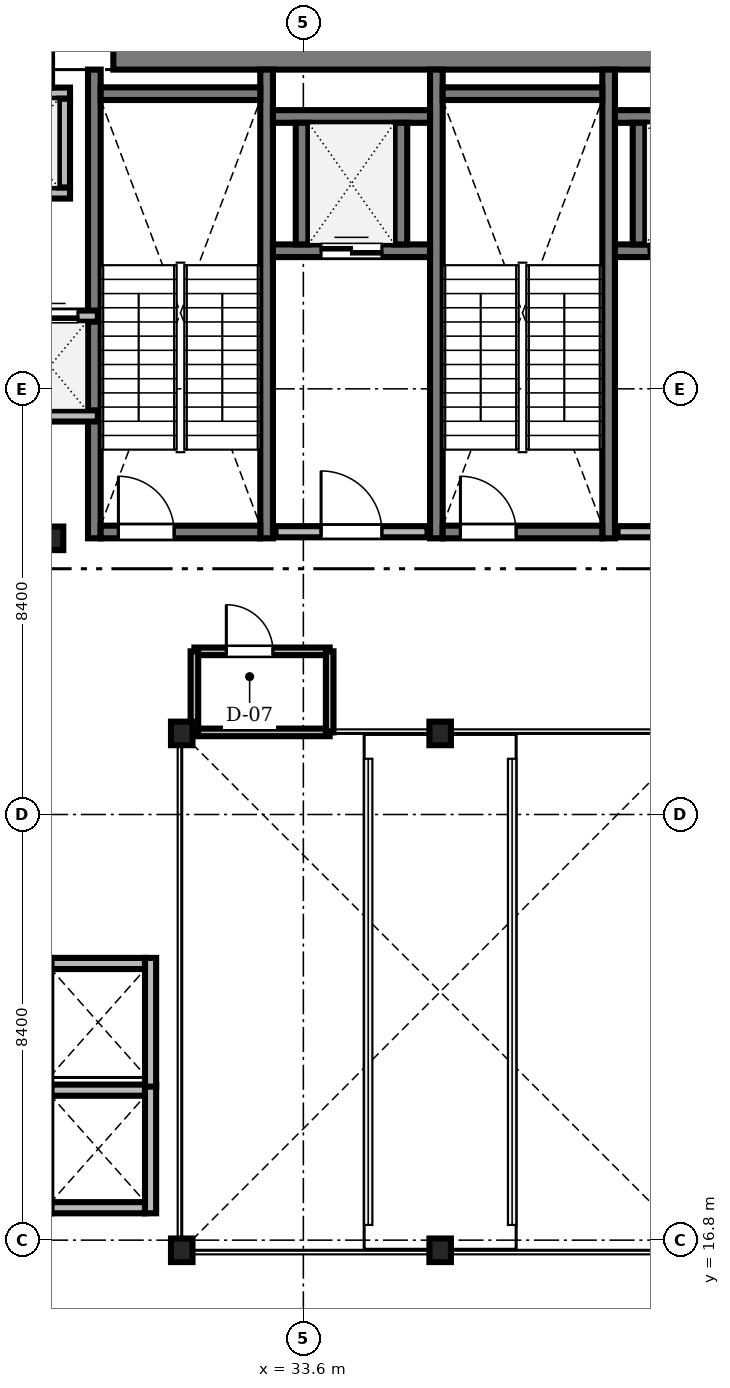
"""IFC4 building model, lengths in metres.
Left out: names, types, materials, properties, quantities, classifications, styles, units other than length and angle.
Written with IfcOpenShell. Run it as: python <this file> out.ifc"""

import sys

from ifc_helpers import new_model, si_unit, direction, frame, frame_2d, origin, origin_2d, place, context, subcontext, project, spatial, rectangle, i_section, extrude, source, transform, mapped, element, fill, save


model = new_model("IFC4")
c1 = context("Model", 3, precision=1e-05, world=origin(), true_north=direction((0.0, 1.0)))
c2 = subcontext(c1, "Body", "Model", "MODEL_VIEW")
j1 = project(units=[si_unit("LENGTHUNIT", "METRE"), si_unit("PLANEANGLEUNIT", "RADIAN")], contexts=[c1])
p1 = place(None, origin())
s1 = spatial("IfcSite", under=j1, at=p1, CompositionType="ELEMENT")
p2 = place(p1, origin())
s2 = spatial("IfcBuilding", under=s1, at=p2, CompositionType="ELEMENT")
p3 = place(p2, frame((0.0, 0.0, 98.7)))
s3 = spatial("IfcBuildingStorey", under=s2, at=p3, CompositionType="ELEMENT", Elevation=98.7)
m1 = source(origin(), c2, "Body", "SweptSolid", [
    extrude(rectangle(XDim=17.52, YDim=0.8, at=frame_2d((8.76, 0.0))), origin(), (0.0, 0.0, 1.0), 4.76),
])
p4 = place(p3, frame((29.85, 40.3, 0.0), z_axis=(0.0, 0.0, 1.0), x_axis=(1.0, 0.0, 0.0)))
e1 = element("IfcWall", 1, at=p4, inside=s3, PredefinedType="SHEAR", context=c2, shape_type="MappedRepresentation", body=[
    mapped(m1, transform((0.0, 0.0, 0.0), scale=1.0)),
])
m2 = source(origin(), c2, "Body", "SweptSolid", [
    extrude(i_section(OverallWidth=0.424, OverallDepth=0.465, WebThickness=0.035, FlangeThickness=0.056, FilletRadius=0.015, at=origin_2d()), origin(), (0.0, 0.0, 1.0), 4.76),
])
for number, where, z_axis, x_axis in (
    (2, (31.2, 16.6, 0.0), (0.0, 0.0, 1.0), (1.0, 0.0, 0.0)),
    (3, (36.3, 16.6, 0.0), (0.0, 0.0, 1.0), (1.0, 0.0, 0.0)),
    (4, (36.3, 26.8, 0.0), (0.0, 0.0, 1.0), (1.0, 0.0, 0.0)),
    (5, (31.2, 26.8, 0.0), (0.0, 0.0, 1.0), (1.0, 0.0, 0.0)),
    (6, (28.65, 30.65, 0.0), (0.0, 0.0, 1.0), (1.0, 0.0, 0.0)),
):
    element("IfcColumn", number, at=place(p3, frame(where, z_axis=z_axis, x_axis=x_axis)), inside=s3, PredefinedType="COLUMN", context=c2, shape_type="MappedRepresentation", body=[
        mapped(m2, transform((0.0, 0.0, 0.0), scale=1.0)),
    ])
m3 = source(origin(), c2, "Body", "SweptSolid", [
    extrude(rectangle(XDim=9.25, YDim=0.25, at=frame_2d((4.625, 0.0))), origin(), (0.0, 0.0, 1.0), 4.8),
])
for number, where, z_axis, x_axis in (
    (7, (29.475, 30.65, 0.0), (0.0, 0.0, 1.0), (0.0, 1.0, 0.0)),
    (8, (32.875, 30.65, 0.0), (0.0, 0.0, 1.0), (0.0, 1.0, 0.0)),
):
    element("IfcWall", number, at=place(p3, frame(where, z_axis=z_axis, x_axis=x_axis)), inside=s3, PredefinedType="SOLIDWALL", context=c2, shape_type="MappedRepresentation", body=[
        mapped(m3, transform((0.0, 0.0, 0.0), scale=1.0)),
    ])
m4 = source(origin(), c2, "Body", "SweptSolid", [
    extrude(rectangle(XDim=3.15, YDim=0.25, at=frame_2d((1.575, 0.0))), origin(), (0.0, 0.0, 1.0), 4.8),
])
p5 = place(p3, frame((29.6, 39.425, 0.0), z_axis=(0.0, 0.0, 1.0), x_axis=(1.0, 0.0, 0.0)))
e9 = element("IfcWall", 9, at=p5, inside=s3, PredefinedType="SOLIDWALL", context=c2, shape_type="MappedRepresentation", body=[
    mapped(m4, transform((0.0, 0.0, 0.0), scale=1.0)),
])
p6 = place(p3, frame((29.6, 30.775, 0.0), z_axis=(0.0, 0.0, 1.0), x_axis=(1.0, 0.0, 0.0)))
e10 = element("IfcWall", 10, at=p6, inside=s3, PredefinedType="SOLIDWALL", context=c2, shape_type="MappedRepresentation", body=[
    mapped(m4, transform((0.0, 0.0, 0.0), scale=1.0)),
])
m5 = source(origin(), c2, "Body", "SweptSolid", [
    extrude(rectangle(XDim=1.1, YDim=2.2, at=frame_2d((0.55, 1.1))), frame((0.0, 0.135, 0.0), z_axis=(0.0, -1.0, 0.0), x_axis=(1.0, 0.0, 0.0)), (0.0, 0.0, 1.0), 0.27),
])
p7 = place(p6, frame((0.35, 0.0, 0.0)))
e11 = element("IfcOpeningElement", 11, at=p7, cuts=e10, PredefinedType="OPENING", context=c2, shape_type="MappedRepresentation", body=[
    mapped(m5, transform((0.0, 0.0, 0.0), scale=1.0)),
])
for number, where, z_axis, x_axis in (
    (12, (36.225, 30.65, 0.0), (0.0, 0.0, 1.0), (0.0, 1.0, 0.0)),
    (13, (39.625, 30.65, 0.0), (0.0, 0.0, 1.0), (0.0, 1.0, 0.0)),
):
    element("IfcWall", number, at=place(p3, frame(where, z_axis=z_axis, x_axis=x_axis)), inside=s3, PredefinedType="SOLIDWALL", context=c2, shape_type="MappedRepresentation", body=[
        mapped(m3, transform((0.0, 0.0, 0.0), scale=1.0)),
    ])
p8 = place(p3, frame((36.35, 39.425, 0.0), z_axis=(0.0, 0.0, 1.0), x_axis=(1.0, 0.0, 0.0)))
e14 = element("IfcWall", 14, at=p8, inside=s3, PredefinedType="SOLIDWALL", context=c2, shape_type="MappedRepresentation", body=[
    mapped(m4, transform((0.0, 0.0, 0.0), scale=1.0)),
])
p9 = place(p3, frame((36.35, 30.775, 0.0), z_axis=(0.0, 0.0, 1.0), x_axis=(1.0, 0.0, 0.0)))
e15 = element("IfcWall", 15, at=p9, inside=s3, PredefinedType="SOLIDWALL", context=c2, shape_type="MappedRepresentation", body=[
    mapped(m4, transform((0.0, 0.0, 0.0), scale=1.0)),
])
p10 = place(p9, frame((0.35, 0.0, 0.0)))
e16 = element("IfcOpeningElement", 16, at=p10, cuts=e15, PredefinedType="OPENING", context=c2, shape_type="MappedRepresentation", body=[
    mapped(m5, transform((0.0, 0.0, 0.0), scale=1.0)),
])
m6 = source(origin(), c2, "Body", "SweptSolid", [
    extrude(rectangle(XDim=3.0, YDim=0.22, at=frame_2d((1.5, 0.0))), origin(), (0.0, 0.0, 1.0), 4.76),
])
p11 = place(p3, frame((33.05, 30.78, 0.0), z_axis=(0.0, 0.0, 1.0), x_axis=(1.0, 0.0, 0.0)))
e17 = element("IfcWall", 17, at=p11, inside=s3, PredefinedType="SOLIDWALL", context=c2, shape_type="MappedRepresentation", body=[
    mapped(m6, transform((0.0, 0.0, 0.0), scale=1.0)),
])
m7 = source(origin(), c2, "Body", "SweptSolid", [
    extrude(rectangle(XDim=1.2, YDim=2.2, at=frame_2d((0.6, 1.1))), frame((0.0, 0.12, 0.0), z_axis=(0.0, -1.0, 0.0), x_axis=(1.0, 0.0, 0.0)), (0.0, 0.0, 1.0), 0.24),
])
p12 = place(p11, frame((0.9, 0.0, 0.0)))
e18 = element("IfcOpeningElement", 18, at=p12, cuts=e17, PredefinedType="OPENING", context=c2, shape_type="MappedRepresentation", body=[
    mapped(m7, transform((0.0, 0.0, 0.0), scale=1.0)),
])
m8 = source(origin(), c2, "Body", "SweptSolid", [
    extrude(rectangle(XDim=2.8, YDim=0.22, at=frame_2d((1.4, 0.0))), origin(), (0.0, 0.0, 1.0), 4.76),
])
p13 = place(p3, frame((39.8, 30.78, 0.0), z_axis=(0.0, 0.0, 1.0), x_axis=(1.0, 0.0, 0.0)))
e19 = element("IfcWall", 19, at=p13, inside=s3, PredefinedType="SOLIDWALL", context=c2, shape_type="MappedRepresentation", body=[
    mapped(m8, transform((0.0, 0.0, 0.0), scale=1.0)),
])
p14 = place(p13, frame((0.8, 0.0, 0.0)))
e20 = element("IfcOpeningElement", 20, at=p14, cuts=e19, PredefinedType="OPENING", context=c2, shape_type="MappedRepresentation", body=[
    mapped(m7, transform((0.0, 0.0, 0.0), scale=1.0)),
])
m9 = source(origin(), c2, "Body", "SweptSolid", [
    extrude(rectangle(XDim=1.99, YDim=0.22, at=frame_2d((0.995, 0.0))), origin(), (0.0, 0.0, 1.0), 4.76),
])
p15 = place(p3, frame((27.005, 37.465, 0.0), z_axis=(0.0, 0.0, 1.0), x_axis=(1.0, 0.0, 0.0)))
e21 = element("IfcWall", 21, at=p15, inside=s3, PredefinedType="SOLIDWALL", context=c2, shape_type="MappedRepresentation", body=[
    mapped(m9, transform((0.0, 0.0, 0.0), scale=1.0)),
])
m10 = source(origin(), c2, "Body", "SweptSolid", [
    extrude(rectangle(XDim=1.1, YDim=2.2, at=frame_2d((0.55, 1.1))), frame((0.0, 0.12, 0.0), z_axis=(0.0, -1.0, 0.0), x_axis=(1.0, 0.0, 0.0)), (0.0, 0.0, 1.0), 0.24),
])
p16 = place(p15, frame((0.445, 0.0, 0.0)))
e22 = element("IfcOpeningElement", 22, at=p16, cuts=e21, PredefinedType="OPENING", context=c2, shape_type="MappedRepresentation", body=[
    mapped(m10, transform((0.0, 0.0, 0.0), scale=1.0)),
])
p17 = place(p3, frame((27.005, 39.435, 0.0), z_axis=(0.0, 0.0, 1.0), x_axis=(1.0, 0.0, 0.0)))
e23 = element("IfcWall", 23, at=p17, inside=s3, PredefinedType="SOLIDWALL", context=c2, shape_type="MappedRepresentation", body=[
    mapped(m9, transform((0.0, 0.0, 0.0), scale=1.0)),
])
m11 = source(origin(), c2, "Body", "SweptSolid", [
    extrude(rectangle(XDim=1.75, YDim=0.22, at=frame_2d((0.875, 0.0))), origin(), (0.0, 0.0, 1.0), 4.76),
])
p18 = place(p3, frame((28.885, 37.575, 0.0), z_axis=(0.0, 0.0, 1.0), x_axis=(0.0, 1.0, 0.0)))
e24 = element("IfcWall", 24, at=p18, inside=s3, PredefinedType="SOLIDWALL", context=c2, shape_type="MappedRepresentation", body=[
    mapped(m11, transform((0.0, 0.0, 0.0), scale=1.0)),
])
m12 = source(origin(), c2, "Body", "SweptSolid", [
    extrude(rectangle(XDim=1.89, YDim=0.22, at=frame_2d((0.945, 0.0))), origin(), (0.0, 0.0, 1.0), 4.76),
])
p19 = place(p3, frame((27.655, 33.065, 0.0), z_axis=(0.0, 0.0, 1.0), x_axis=(1.0, 0.0, 0.0)))
e25 = element("IfcWall", 25, at=p19, inside=s3, PredefinedType="SOLIDWALL", context=c2, shape_type="MappedRepresentation", body=[
    mapped(m12, transform((0.0, 0.0, 0.0), scale=1.0)),
])
p20 = place(p3, frame((27.655, 35.035, 0.0), z_axis=(0.0, 0.0, 1.0), x_axis=(1.0, 0.0, 0.0)))
e26 = element("IfcWall", 26, at=p20, inside=s3, PredefinedType="SOLIDWALL", context=c2, shape_type="MappedRepresentation", body=[
    mapped(m12, transform((0.0, 0.0, 0.0), scale=1.0)),
])
p21 = place(p20, frame((0.395, 0.0, 0.0)))
e27 = element("IfcOpeningElement", 27, at=p21, cuts=e26, PredefinedType="OPENING", context=c2, shape_type="MappedRepresentation", body=[
    mapped(m10, transform((0.0, 0.0, 0.0), scale=1.0)),
])
m13 = source(origin(), c2, "Body", "SweptSolid", [
    extrude(rectangle(XDim=3.1, YDim=0.25, at=frame_2d((1.55, 0.0))), origin(), (0.0, 0.0, 1.0), 4.76),
])
p22 = place(p3, frame((33.0, 36.325, 0.0), z_axis=(0.0, 0.0, 1.0), x_axis=(1.0, 0.0, 0.0)))
e28 = element("IfcWall", 28, at=p22, inside=s3, PredefinedType="SOLIDWALL", context=c2, shape_type="MappedRepresentation", body=[
    mapped(m13, transform((0.0, 0.0, 0.0), scale=1.0)),
])
m14 = source(origin(), c2, "Body", "SweptSolid", [
    extrude(rectangle(XDim=1.2, YDim=2.25, at=frame_2d((0.6, 1.125))), frame((0.0, 0.135, 0.0), z_axis=(0.0, -1.0, 0.0), x_axis=(1.0, 0.0, 0.0)), (0.0, 0.0, 1.0), 0.27),
])
p23 = place(p22, frame((0.95, 0.0, 0.0)))
e29 = element("IfcOpeningElement", 29, at=p23, cuts=e28, PredefinedType="OPENING", context=c2, shape_type="MappedRepresentation", body=[
    mapped(m14, transform((0.0, 0.0, 0.0), scale=1.0)),
])
p24 = place(p3, frame((33.0, 38.975, 0.0), z_axis=(0.0, 0.0, 1.0), x_axis=(1.0, 0.0, 0.0)))
e30 = element("IfcWall", 30, at=p24, inside=s3, PredefinedType="SOLIDWALL", context=c2, shape_type="MappedRepresentation", body=[
    mapped(m13, transform((0.0, 0.0, 0.0), scale=1.0)),
])
m15 = source(origin(), c2, "Body", "SweptSolid", [
    extrude(rectangle(XDim=2.4, YDim=0.25, at=frame_2d((1.2, 0.0))), origin(), (0.0, 0.0, 1.0), 4.76),
])
for number, where, z_axis, x_axis in (
    (31, (33.575, 36.45, 0.0), (0.0, 0.0, 1.0), (0.0, 1.0, 0.0)),
    (32, (35.525, 36.45, 0.0), (0.0, 0.0, 1.0), (0.0, 1.0, 0.0)),
):
    element("IfcWall", number, at=place(p3, frame(where, z_axis=z_axis, x_axis=x_axis)), inside=s3, PredefinedType="SOLIDWALL", context=c2, shape_type="MappedRepresentation", body=[
        mapped(m15, transform((0.0, 0.0, 0.0), scale=1.0)),
    ])
m16 = source(origin(), c2, "Body", "SweptSolid", [
    extrude(rectangle(XDim=2.55, YDim=0.25, at=frame_2d((1.275, 0.0))), origin(), (0.0, 0.0, 1.0), 4.76),
])
p25 = place(p3, frame((39.75, 36.325, 0.0), z_axis=(0.0, 0.0, 1.0), x_axis=(1.0, 0.0, 0.0)))
e33 = element("IfcWall", 33, at=p25, inside=s3, PredefinedType="SOLIDWALL", context=c2, shape_type="MappedRepresentation", body=[
    mapped(m16, transform((0.0, 0.0, 0.0), scale=1.0)),
])
p26 = place(p25, frame((0.675, 0.0, 0.0)))
e34 = element("IfcOpeningElement", 34, at=p26, cuts=e33, PredefinedType="OPENING", context=c2, shape_type="MappedRepresentation", body=[
    mapped(m14, transform((0.0, 0.0, 0.0), scale=1.0)),
])
p27 = place(p3, frame((39.75, 38.975, 0.0), z_axis=(0.0, 0.0, 1.0), x_axis=(1.0, 0.0, 0.0)))
e35 = element("IfcWall", 35, at=p27, inside=s3, PredefinedType="SOLIDWALL", context=c2, shape_type="MappedRepresentation", body=[
    mapped(m16, transform((0.0, 0.0, 0.0), scale=1.0)),
])
p28 = place(p3, frame((40.225, 36.45, 0.0), z_axis=(0.0, 0.0, 1.0), x_axis=(0.0, 1.0, 0.0)))
e36 = element("IfcWall", 36, at=p28, inside=s3, PredefinedType="SOLIDWALL", context=c2, shape_type="MappedRepresentation", body=[
    mapped(m15, transform((0.0, 0.0, 0.0), scale=1.0)),
])
m17 = source(origin(), c2, "Body", "SweptSolid", [
    extrude(rectangle(XDim=1.85, YDim=0.22, at=frame_2d((0.925, 0.0))), origin(), (0.0, 0.0, 1.0), 4.76),
])
for number, where, z_axis, x_axis in (
    (37, (28.625, 17.44, 0.0), (0.0, 0.0, 1.0), (1.0, 0.0, 0.0)),
    (38, (28.625, 19.76, 0.0), (0.0, 0.0, 1.0), (1.0, 0.0, 0.0)),
):
    element("IfcWall", number, at=place(p3, frame(where, z_axis=z_axis, x_axis=x_axis)), inside=s3, PredefinedType="SOLIDWALL", context=c2, shape_type="MappedRepresentation", body=[
        mapped(m17, transform((0.0, 0.0, 0.0), scale=1.0)),
    ])
m18 = source(origin(), c2, "Body", "SweptSolid", [
    extrude(rectangle(XDim=2.54, YDim=0.22, at=frame_2d((1.27, 0.0))), origin(), (0.0, 0.0, 1.0), 4.76),
])
p29 = place(p3, frame((30.585, 17.33, 0.0), z_axis=(0.0, 0.0, 1.0), x_axis=(0.0, 1.0, 0.0)))
e39 = element("IfcWall", 39, at=p29, inside=s3, PredefinedType="SOLIDWALL", context=c2, shape_type="MappedRepresentation", body=[
    mapped(m18, transform((0.0, 0.0, 0.0), scale=1.0)),
])
p30 = place(p3, frame((28.625, 22.26, 0.0), z_axis=(0.0, 0.0, 1.0), x_axis=(1.0, 0.0, 0.0)))
e40 = element("IfcWall", 40, at=p30, inside=s3, PredefinedType="SOLIDWALL", context=c2, shape_type="MappedRepresentation", body=[
    mapped(m17, transform((0.0, 0.0, 0.0), scale=1.0)),
])
p31 = place(p3, frame((30.585, 19.83, 0.0), z_axis=(0.0, 0.0, 1.0), x_axis=(0.0, 1.0, 0.0)))
e41 = element("IfcWall", 41, at=p31, inside=s3, PredefinedType="SOLIDWALL", context=c2, shape_type="MappedRepresentation", body=[
    mapped(m18, transform((0.0, 0.0, 0.0), scale=1.0)),
])
m19 = source(origin(), c2, "Body", "SweptSolid", [
    extrude(rectangle(XDim=2.67, YDim=0.15, at=frame_2d((1.335, 0.0))), origin(), (0.0, 0.0, 1.0), 4.392),
])
p32 = place(p3, frame((31.45, 28.42, 0.0), z_axis=(0.0, 0.0, 1.0), x_axis=(1.0, 0.0, 0.0)))
e42 = element("IfcWall", 42, at=p32, inside=s3, PredefinedType="PARTITIONING", context=c2, shape_type="MappedRepresentation", body=[
    mapped(m19, transform((0.0, 0.0, 0.0), scale=1.0)),
])
m20 = source(origin(), c2, "Body", "SweptSolid", [
    extrude(rectangle(XDim=0.92, YDim=2.1, at=frame_2d((0.46, 1.05))), frame((0.0, 0.085, 0.0), z_axis=(0.0, -1.0, 0.0), x_axis=(1.0, 0.0, 0.0)), (0.0, 0.0, 1.0), 0.17),
])
p33 = place(p32, frame((0.63, 0.0, 0.0)))
e43 = element("IfcOpeningElement", 43, at=p33, cuts=e42, PredefinedType="OPENING", context=c2, shape_type="MappedRepresentation", body=[
    mapped(m20, transform((0.0, 0.0, 0.0), scale=1.0)),
])
m21 = source(origin(), c2, "Body", "SweptSolid", [
    extrude(rectangle(XDim=2.67, YDim=0.15, at=frame_2d((1.335, 0.0))), origin(), (0.0, 0.0, 1.0), 4.302),
])
p34 = place(p3, frame((31.45, 26.82, 0.0), z_axis=(0.0, 0.0, 1.0), x_axis=(1.0, 0.0, 0.0)))
e44 = element("IfcWall", 44, at=p34, inside=s3, PredefinedType="PARTITIONING", context=c2, shape_type="MappedRepresentation", body=[
    mapped(m21, transform((0.0, 0.0, 0.0), scale=1.0)),
])
m22 = source(origin(), c2, "Body", "SweptSolid", [
    extrude(rectangle(XDim=1.6, YDim=0.15, at=frame_2d((0.8, 0.0))), origin(), (0.0, 0.0, 1.0), 4.302),
])
for number, where, z_axis, x_axis in (
    (45, (31.45, 26.82, 0.0), (0.0, 0.0, 1.0), (0.0, 1.0, 0.0)),
    (46, (34.12, 26.82, 0.0), (0.0, 0.0, 1.0), (0.0, 1.0, 0.0)),
):
    element("IfcWall", number, at=place(p3, frame(where, z_axis=z_axis, x_axis=x_axis)), inside=s3, PredefinedType="PARTITIONING", context=c2, shape_type="MappedRepresentation", body=[
        mapped(m22, transform((0.0, 0.0, 0.0), scale=1.0)),
    ])
m23 = source(origin(), c2, "Body", "SweptSolid", [
    extrude(rectangle(XDim=1.1, YDim=2.2, at=frame_2d((0.55, 1.1))), frame((0.0, 0.025, 0.0), z_axis=(0.0, -1.0, 0.0), x_axis=(1.0, 0.0, 0.0)), (0.0, 0.0, 1.0), 0.05),
])
p35 = place(p7, origin())
e47 = element("IfcDoor", 47, at=p35, inside=s3, OperationType="SINGLE_SWING_LEFT", PredefinedType="DOOR", context=c2, shape_type="MappedRepresentation", body=[
    mapped(m23, transform((0.0, 0.0, 0.0), scale=1.0)),
])
fill(e11, e47)
p36 = place(p10, origin())
e48 = element("IfcDoor", 48, at=p36, inside=s3, OperationType="SINGLE_SWING_LEFT", PredefinedType="DOOR", context=c2, shape_type="MappedRepresentation", body=[
    mapped(m23, transform((0.0, 0.0, 0.0), scale=1.0)),
])
fill(e16, e48)
m24 = source(origin(), c2, "Body", "SweptSolid", [
    extrude(rectangle(XDim=1.2, YDim=2.2, at=frame_2d((0.6, 1.1))), frame((0.0, 0.025, 0.0), z_axis=(0.0, -1.0, 0.0), x_axis=(1.0, 0.0, 0.0)), (0.0, 0.0, 1.0), 0.05),
])
p37 = place(p12, origin())
e49 = element("IfcDoor", 49, at=p37, inside=s3, OperationType="SINGLE_SWING_LEFT", PredefinedType="DOOR", context=c2, shape_type="MappedRepresentation", body=[
    mapped(m24, transform((0.0, 0.0, 0.0), scale=1.0)),
])
fill(e18, e49)
p38 = place(p21, origin())
e50 = element("IfcDoor", 50, at=p38, inside=s3, OperationType="DOUBLE_DOOR_SLIDING", PredefinedType="DOOR", context=c2, shape_type="MappedRepresentation", body=[
    mapped(m23, transform((0.0, 0.0, 0.0), scale=1.0)),
])
fill(e27, e50)
m25 = source(origin(), c2, "Body", "SweptSolid", [
    extrude(rectangle(XDim=1.2, YDim=2.25, at=frame_2d((0.6, 1.125))), frame((0.0, 0.025, 0.0), z_axis=(0.0, -1.0, 0.0), x_axis=(1.0, 0.0, 0.0)), (0.0, 0.0, 1.0), 0.05),
])
p39 = place(p23, origin())
e51 = element("IfcDoor", 51, at=p39, inside=s3, OperationType="DOUBLE_DOOR_SLIDING", PredefinedType="DOOR", context=c2, shape_type="MappedRepresentation", body=[
    mapped(m25, transform((0.0, 0.0, 0.0), scale=1.0)),
])
fill(e29, e51)
p40 = place(p26, origin())
e52 = element("IfcDoor", 52, at=p40, inside=s3, OperationType="DOUBLE_DOOR_SLIDING", PredefinedType="DOOR", context=c2, shape_type="MappedRepresentation", body=[
    mapped(m25, transform((0.0, 0.0, 0.0), scale=1.0)),
])
fill(e34, e52)
m26 = source(origin(), c2, "Body", "SweptSolid", [
    extrude(rectangle(XDim=0.92, YDim=2.1, at=frame_2d((0.46, 1.05))), frame((0.0, 0.025, 0.0), z_axis=(0.0, -1.0, 0.0), x_axis=(1.0, 0.0, 0.0)), (0.0, 0.0, 1.0), 0.05),
])
p41 = place(p33, origin())
e53 = element("IfcDoor", 53, at=p41, inside=s3, OperationType="SINGLE_SWING_LEFT", PredefinedType="DOOR", context=c2, shape_type="MappedRepresentation", body=[
    mapped(m26, transform((0.0, 0.0, 0.0), scale=1.0)),
])
fill(e43, e53)
save(model, sys.argv[1])
